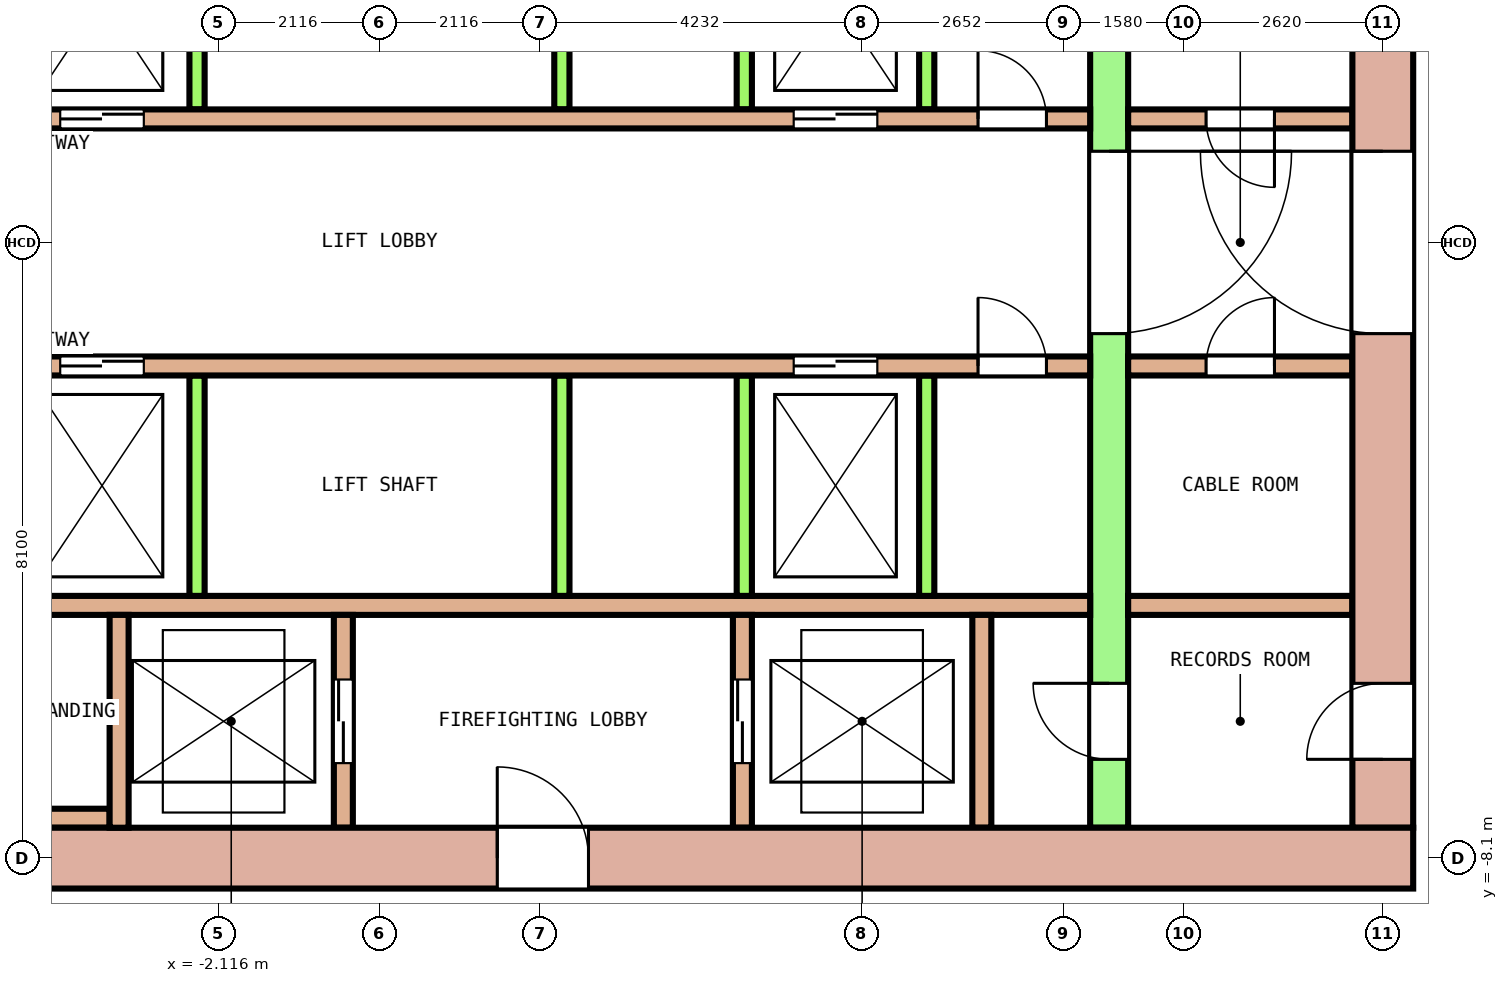
"""IFC4 building model, lengths in metres.
Left out: names, types, materials, properties, quantities, classifications, styles, units other than length and angle.
Written with IfcOpenShell. Run it as: python <this file> out.ifc"""

import sys

from ifc_helpers import new_model, si_unit, direction, frame, frame_2d, origin, place, context, subcontext, project, spatial, rectangle, extrude, element, fill, save


model = new_model("IFC4")
c1 = context("Model", 3, precision=1e-05, world=origin(), true_north=direction((0.0, 1.0)))
c2 = subcontext(c1, "Body", "Model", "MODEL_VIEW")
j1 = project(units=[si_unit("LENGTHUNIT", "METRE"), si_unit("PLANEANGLEUNIT", "RADIAN")], contexts=[c1])
p1 = place(None, origin())
s1 = spatial("IfcSite", under=j1, at=p1, CompositionType="ELEMENT")
p2 = place(p1, origin())
s2 = spatial("IfcBuilding", under=s1, at=p2, CompositionType="ELEMENT")
p3 = place(p2, frame((0.0, 0.0, 130.8)))
s3 = spatial("IfcBuildingStorey", under=s2, at=p3, CompositionType="ELEMENT", Elevation=130.8)
p4 = place(p3, frame((-13.6, -8.1, 0.0), z_axis=(0.0, 0.0, 1.0), x_axis=(1.0, 0.0, 0.0)))
e1 = element("IfcWall", 1, at=p4, inside=s3, PredefinedType="SHEAR", context=c2, shape_type="SweptSolid", body=[
    extrude(rectangle(XDim=27.2, YDim=0.8, at=frame_2d((13.6, 0.0))), origin(), (0.0, 0.0, 1.0), 4.1),
])
p5 = place(p4, frame((15.15, 0.0, 0.0)))
e2 = element("IfcOpeningElement", 2, at=p5, cuts=e1, PredefinedType="OPENING", context=c2, shape_type="SweptSolid", body=[
    extrude(rectangle(XDim=1.2, YDim=2.1, at=frame_2d((0.6, 1.05))), frame((0.0, 0.41, 0.0), z_axis=(0.0, -1.0, 0.0), x_axis=(1.0, 0.0, 0.0)), (0.0, 0.0, 1.0), 0.82),
])
p6 = place(p3, frame((13.2, -7.7, 0.0), z_axis=(0.0, 0.0, 1.0), x_axis=(0.0, 1.0, 0.0)))
e3 = element("IfcWall", 3, at=p6, inside=s3, PredefinedType="SHEAR", context=c2, shape_type="SweptSolid", body=[
    extrude(rectangle(XDim=15.4, YDim=0.8, at=frame_2d((7.7, 0.0))), origin(), (0.0, 0.0, 1.0), 4.1),
])
p7 = place(p6, frame((6.5, 0.0, 0.0)))
e4 = element("IfcOpeningElement", 4, at=p7, cuts=e3, PredefinedType="OPENING", context=c2, shape_type="SweptSolid", body=[
    extrude(rectangle(XDim=2.4, YDim=2.1, at=frame_2d((1.2, 1.05))), frame((0.0, 0.41, 0.0), z_axis=(0.0, -1.0, 0.0), x_axis=(1.0, 0.0, 0.0)), (0.0, 0.0, 1.0), 0.82),
])
p8 = place(p6, frame((13.4, 0.0, 0.0)))
e5 = element("IfcOpeningElement", 5, at=p8, cuts=e3, PredefinedType="OPENING", context=c2, shape_type="SweptSolid", body=[
    extrude(rectangle(XDim=1.2, YDim=2.1, at=frame_2d((0.6, 1.05))), frame((0.0, 0.41, 0.0), z_axis=(0.0, -1.0, 0.0), x_axis=(1.0, 0.0, 0.0)), (0.0, 0.0, 1.0), 0.82),
])
p9 = place(p6, frame((0.9, 0.0, 0.0)))
e6 = element("IfcOpeningElement", 6, at=p9, cuts=e3, PredefinedType="OPENING", context=c2, shape_type="SweptSolid", body=[
    extrude(rectangle(XDim=1.0, YDim=2.1, at=frame_2d((0.5, 1.05))), frame((0.0, 0.41, 0.0), z_axis=(0.0, -1.0, 0.0), x_axis=(1.0, 0.0, 0.0)), (0.0, 0.0, 1.0), 0.82),
])
p10 = place(p3, frame((9.6, -7.7, 0.0), z_axis=(0.0, 0.0, 1.0), x_axis=(0.0, 1.0, 0.0)))
e7 = element("IfcWall", 7, at=p10, inside=s3, PredefinedType="SHEAR", context=c2, shape_type="SweptSolid", body=[
    extrude(rectangle(XDim=15.4, YDim=0.5, at=frame_2d((7.7, 0.0))), origin(), (0.0, 0.0, 1.0), 4.1),
])
p11 = place(p10, frame((6.5, 0.0, 0.0)))
e8 = element("IfcOpeningElement", 8, at=p11, cuts=e7, PredefinedType="OPENING", context=c2, shape_type="SweptSolid", body=[
    extrude(rectangle(XDim=2.4, YDim=2.1, at=frame_2d((1.2, 1.05))), frame((0.0, 0.26, 0.0), z_axis=(0.0, -1.0, 0.0), x_axis=(1.0, 0.0, 0.0)), (0.0, 0.0, 1.0), 0.52),
])
p12 = place(p10, frame((13.4, 0.0, 0.0)))
e9 = element("IfcOpeningElement", 9, at=p12, cuts=e7, PredefinedType="OPENING", context=c2, shape_type="SweptSolid", body=[
    extrude(rectangle(XDim=1.2, YDim=2.1, at=frame_2d((0.6, 1.05))), frame((0.0, 0.26, 0.0), z_axis=(0.0, -1.0, 0.0), x_axis=(1.0, 0.0, 0.0)), (0.0, 0.0, 1.0), 0.52),
])
p13 = place(p10, frame((0.9, 0.0, 0.0)))
e10 = element("IfcOpeningElement", 10, at=p13, cuts=e7, PredefinedType="OPENING", context=c2, shape_type="SweptSolid", body=[
    extrude(rectangle(XDim=1.0, YDim=2.1, at=frame_2d((0.5, 1.05))), frame((0.0, 0.26, 0.0), z_axis=(0.0, -1.0, 0.0), x_axis=(1.0, 0.0, 0.0)), (0.0, 0.0, 1.0), 0.52),
])
p14 = place(p3, frame((-9.35, 1.625, 0.0), z_axis=(0.0, 0.0, 1.0), x_axis=(1.0, 0.0, 0.0)))
e11 = element("IfcWall", 11, at=p14, inside=s3, PredefinedType="SOLIDWALL", context=c2, shape_type="SweptSolid", body=[
    extrude(rectangle(XDim=18.7, YDim=0.25, at=frame_2d((9.35, 0.0))), origin(), (0.0, 0.0, 1.0), 4.1),
])
p15 = place(p14, frame((2.85, 0.0, 0.0)))
e12 = element("IfcOpeningElement", 12, at=p15, cuts=e11, PredefinedType="OPENING", context=c2, shape_type="SweptSolid", body=[
    extrude(rectangle(XDim=1.1, YDim=2.1, at=frame_2d((0.55, 1.05))), frame((0.0, 0.135, 0.0), z_axis=(0.0, -1.0, 0.0), x_axis=(1.0, 0.0, 0.0)), (0.0, 0.0, 1.0), 0.27),
])
p16 = place(p14, frame((5.15, 0.0, 0.0)))
e13 = element("IfcOpeningElement", 13, at=p16, cuts=e11, PredefinedType="OPENING", context=c2, shape_type="SweptSolid", body=[
    extrude(rectangle(XDim=1.1, YDim=2.1, at=frame_2d((0.55, 1.05))), frame((0.0, 0.135, 0.0), z_axis=(0.0, -1.0, 0.0), x_axis=(1.0, 0.0, 0.0)), (0.0, 0.0, 1.0), 0.27),
])
p17 = place(p14, frame((14.8, 0.0, 0.0)))
e14 = element("IfcOpeningElement", 14, at=p17, cuts=e11, PredefinedType="OPENING", context=c2, shape_type="SweptSolid", body=[
    extrude(rectangle(XDim=1.1, YDim=2.1, at=frame_2d((0.55, 1.05))), frame((0.0, 0.135, 0.0), z_axis=(0.0, -1.0, 0.0), x_axis=(1.0, 0.0, 0.0)), (0.0, 0.0, 1.0), 0.27),
])
p18 = place(p14, frame((0.575, 0.0, 0.0)))
e15 = element("IfcOpeningElement", 15, at=p18, cuts=e11, PredefinedType="OPENING", context=c2, shape_type="SweptSolid", body=[
    extrude(rectangle(XDim=0.9, YDim=2.1, at=frame_2d((0.45, 1.05))), frame((0.0, 0.135, 0.0), z_axis=(0.0, -1.0, 0.0), x_axis=(1.0, 0.0, 0.0)), (0.0, 0.0, 1.0), 0.27),
])
p19 = place(p14, frame((17.225, 0.0, 0.0)))
e16 = element("IfcOpeningElement", 16, at=p19, cuts=e11, PredefinedType="OPENING", context=c2, shape_type="SweptSolid", body=[
    extrude(rectangle(XDim=0.9, YDim=2.1, at=frame_2d((0.45, 1.05))), frame((0.0, 0.135, 0.0), z_axis=(0.0, -1.0, 0.0), x_axis=(1.0, 0.0, 0.0)), (0.0, 0.0, 1.0), 0.27),
])
p20 = place(p3, frame((9.85, 1.625, 0.0), z_axis=(0.0, 0.0, 1.0), x_axis=(1.0, 0.0, 0.0)))
e17 = element("IfcWall", 17, at=p20, inside=s3, PredefinedType="SOLIDWALL", context=c2, shape_type="SweptSolid", body=[
    extrude(rectangle(XDim=2.95, YDim=0.25, at=frame_2d((1.475, 0.0))), origin(), (0.0, 0.0, 1.0), 4.1),
])
p21 = place(p20, frame((1.025, 0.0, 0.0)))
e18 = element("IfcOpeningElement", 18, at=p21, cuts=e17, PredefinedType="OPENING", context=c2, shape_type="SweptSolid", body=[
    extrude(rectangle(XDim=0.9, YDim=2.1, at=frame_2d((0.45, 1.05))), frame((0.0, 0.135, 0.0), z_axis=(0.0, -1.0, 0.0), x_axis=(1.0, 0.0, 0.0)), (0.0, 0.0, 1.0), 0.27),
])
for number, where, z_axis, x_axis in (
    (19, (-2.4, 1.75, 0.0), (0.0, 0.0, 1.0), (0.0, 1.0, 0.0)),
    (20, (2.4, 1.75, 0.0), (0.0, 0.0, 1.0), (0.0, 1.0, 0.0)),
    (21, (4.8, 1.75, 0.0), (0.0, 0.0, 1.0), (0.0, 1.0, 0.0)),
    (22, (7.2, 1.75, 0.0), (0.0, 0.0, 1.0), (0.0, 1.0, 0.0)),
):
    element("IfcWall", number, at=place(p3, frame(where, z_axis=z_axis, x_axis=x_axis)), inside=s3, PredefinedType="SOLIDWALL", context=c2, shape_type="SweptSolid", body=[
        extrude(rectangle(XDim=2.9, YDim=0.2, at=frame_2d((1.45, 0.0))), origin(), (0.0, 0.0, 1.0), 4.1),
    ])
p22 = place(p3, frame((-9.35, -1.625, 0.0), z_axis=(0.0, 0.0, 1.0), x_axis=(1.0, 0.0, 0.0)))
e23 = element("IfcWall", 23, at=p22, inside=s3, PredefinedType="SOLIDWALL", context=c2, shape_type="SweptSolid", body=[
    extrude(rectangle(XDim=18.7, YDim=0.25, at=frame_2d((9.35, 0.0))), origin(), (0.0, 0.0, 1.0), 4.1),
])
p23 = place(p22, frame((2.85, 0.0, 0.0)))
e24 = element("IfcOpeningElement", 24, at=p23, cuts=e23, PredefinedType="OPENING", context=c2, shape_type="SweptSolid", body=[
    extrude(rectangle(XDim=1.1, YDim=2.1, at=frame_2d((0.55, 1.05))), frame((0.0, 0.135, 0.0), z_axis=(0.0, -1.0, 0.0), x_axis=(1.0, 0.0, 0.0)), (0.0, 0.0, 1.0), 0.27),
])
p24 = place(p22, frame((5.15, 0.0, 0.0)))
e25 = element("IfcOpeningElement", 25, at=p24, cuts=e23, PredefinedType="OPENING", context=c2, shape_type="SweptSolid", body=[
    extrude(rectangle(XDim=1.1, YDim=2.1, at=frame_2d((0.55, 1.05))), frame((0.0, 0.135, 0.0), z_axis=(0.0, -1.0, 0.0), x_axis=(1.0, 0.0, 0.0)), (0.0, 0.0, 1.0), 0.27),
])
p25 = place(p22, frame((14.8, 0.0, 0.0)))
e26 = element("IfcOpeningElement", 26, at=p25, cuts=e23, PredefinedType="OPENING", context=c2, shape_type="SweptSolid", body=[
    extrude(rectangle(XDim=1.1, YDim=2.1, at=frame_2d((0.55, 1.05))), frame((0.0, 0.135, 0.0), z_axis=(0.0, -1.0, 0.0), x_axis=(1.0, 0.0, 0.0)), (0.0, 0.0, 1.0), 0.27),
])
p26 = place(p22, frame((0.575, 0.0, 0.0)))
e27 = element("IfcOpeningElement", 27, at=p26, cuts=e23, PredefinedType="OPENING", context=c2, shape_type="SweptSolid", body=[
    extrude(rectangle(XDim=0.9, YDim=2.1, at=frame_2d((0.45, 1.05))), frame((0.0, 0.135, 0.0), z_axis=(0.0, -1.0, 0.0), x_axis=(1.0, 0.0, 0.0)), (0.0, 0.0, 1.0), 0.27),
])
p27 = place(p22, frame((17.225, 0.0, 0.0)))
e28 = element("IfcOpeningElement", 28, at=p27, cuts=e23, PredefinedType="OPENING", context=c2, shape_type="SweptSolid", body=[
    extrude(rectangle(XDim=0.9, YDim=2.1, at=frame_2d((0.45, 1.05))), frame((0.0, 0.135, 0.0), z_axis=(0.0, -1.0, 0.0), x_axis=(1.0, 0.0, 0.0)), (0.0, 0.0, 1.0), 0.27),
])
p28 = place(p3, frame((9.85, -1.625, 0.0), z_axis=(0.0, 0.0, 1.0), x_axis=(1.0, 0.0, 0.0)))
e29 = element("IfcWall", 29, at=p28, inside=s3, PredefinedType="SOLIDWALL", context=c2, shape_type="SweptSolid", body=[
    extrude(rectangle(XDim=2.95, YDim=0.25, at=frame_2d((1.475, 0.0))), origin(), (0.0, 0.0, 1.0), 4.1),
])
p29 = place(p28, frame((1.025, 0.0, 0.0)))
e30 = element("IfcOpeningElement", 30, at=p29, cuts=e29, PredefinedType="OPENING", context=c2, shape_type="SweptSolid", body=[
    extrude(rectangle(XDim=0.9, YDim=2.1, at=frame_2d((0.45, 1.05))), frame((0.0, 0.135, 0.0), z_axis=(0.0, -1.0, 0.0), x_axis=(1.0, 0.0, 0.0)), (0.0, 0.0, 1.0), 0.27),
])
p30 = place(p3, frame((-9.35, -4.775, 0.0), z_axis=(0.0, 0.0, 1.0), x_axis=(1.0, 0.0, 0.0)))
e31 = element("IfcWall", 31, at=p30, inside=s3, PredefinedType="SOLIDWALL", context=c2, shape_type="SweptSolid", body=[
    extrude(rectangle(XDim=18.7, YDim=0.25, at=frame_2d((9.35, 0.0))), origin(), (0.0, 0.0, 1.0), 4.1),
])
p31 = place(p3, frame((9.85, -4.775, 0.0), z_axis=(0.0, 0.0, 1.0), x_axis=(1.0, 0.0, 0.0)))
e32 = element("IfcWall", 32, at=p31, inside=s3, PredefinedType="SOLIDWALL", context=c2, shape_type="SweptSolid", body=[
    extrude(rectangle(XDim=2.95, YDim=0.25, at=frame_2d((1.475, 0.0))), origin(), (0.0, 0.0, 1.0), 4.1),
])
for number, where, z_axis, x_axis in (
    (33, (-2.4, -4.65, 0.0), (0.0, 0.0, 1.0), (0.0, 1.0, 0.0)),
    (34, (2.4, -4.65, 0.0), (0.0, 0.0, 1.0), (0.0, 1.0, 0.0)),
    (35, (4.8, -4.65, 0.0), (0.0, 0.0, 1.0), (0.0, 1.0, 0.0)),
    (36, (7.2, -4.65, 0.0), (0.0, 0.0, 1.0), (0.0, 1.0, 0.0)),
):
    element("IfcWall", number, at=place(p3, frame(where, z_axis=z_axis, x_axis=x_axis)), inside=s3, PredefinedType="SOLIDWALL", context=c2, shape_type="SweptSolid", body=[
        extrude(rectangle(XDim=2.9, YDim=0.2, at=frame_2d((1.45, 0.0))), origin(), (0.0, 0.0, 1.0), 4.1),
    ])
p32 = place(p3, frame((-9.35, -7.575, 0.0), z_axis=(0.0, 0.0, 1.0), x_axis=(1.0, 0.0, 0.0)))
e37 = element("IfcWall", 37, at=p32, inside=s3, PredefinedType="SOLIDWALL", context=c2, shape_type="SweptSolid", body=[
    extrude(rectangle(XDim=5.8, YDim=0.25, at=frame_2d((2.9, 0.0))), origin(), (0.0, 0.0, 1.0), 4.1),
])
p33 = place(p3, frame((-3.425, -7.7, 0.0), z_axis=(0.0, 0.0, 1.0), x_axis=(0.0, 1.0, 0.0)))
e38 = element("IfcWall", 38, at=p33, inside=s3, PredefinedType="SOLIDWALL", context=c2, shape_type="SweptSolid", body=[
    extrude(rectangle(XDim=2.8, YDim=0.25, at=frame_2d((1.4, 0.0))), origin(), (0.0, 0.0, 1.0), 4.1),
])
p34 = place(p3, frame((-0.475, -7.7, 0.0), z_axis=(0.0, 0.0, 1.0), x_axis=(0.0, 1.0, 0.0)))
e39 = element("IfcWall", 39, at=p34, inside=s3, PredefinedType="SOLIDWALL", context=c2, shape_type="SweptSolid", body=[
    extrude(rectangle(XDim=2.8, YDim=0.25, at=frame_2d((1.4, 0.0))), origin(), (0.0, 0.0, 1.0), 4.1),
])
p35 = place(p34, frame((0.85, 0.0, 0.0)))
e40 = element("IfcOpeningElement", 40, at=p35, cuts=e39, PredefinedType="OPENING", context=c2, shape_type="SweptSolid", body=[
    extrude(rectangle(XDim=1.1, YDim=2.1, at=frame_2d((0.55, 1.05))), frame((0.0, 0.135, 0.0), z_axis=(0.0, -1.0, 0.0), x_axis=(1.0, 0.0, 0.0)), (0.0, 0.0, 1.0), 0.27),
])
p36 = place(p3, frame((4.775, -7.7, 0.0), z_axis=(0.0, 0.0, 1.0), x_axis=(0.0, 1.0, 0.0)))
e41 = element("IfcWall", 41, at=p36, inside=s3, PredefinedType="SOLIDWALL", context=c2, shape_type="SweptSolid", body=[
    extrude(rectangle(XDim=2.8, YDim=0.25, at=frame_2d((1.4, 0.0))), origin(), (0.0, 0.0, 1.0), 4.1),
])
p37 = place(p36, frame((0.85, 0.0, 0.0)))
e42 = element("IfcOpeningElement", 42, at=p37, cuts=e41, PredefinedType="OPENING", context=c2, shape_type="SweptSolid", body=[
    extrude(rectangle(XDim=1.1, YDim=2.1, at=frame_2d((0.55, 1.05))), frame((0.0, 0.135, 0.0), z_axis=(0.0, -1.0, 0.0), x_axis=(1.0, 0.0, 0.0)), (0.0, 0.0, 1.0), 0.27),
])
p38 = place(p3, frame((7.925, -7.7, 0.0), z_axis=(0.0, 0.0, 1.0), x_axis=(0.0, 1.0, 0.0)))
e43 = element("IfcWall", 43, at=p38, inside=s3, PredefinedType="SOLIDWALL", context=c2, shape_type="SweptSolid", body=[
    extrude(rectangle(XDim=2.8, YDim=0.25, at=frame_2d((1.4, 0.0))), origin(), (0.0, 0.0, 1.0), 4.1),
])
p39 = place(p16, origin())
e44 = element("IfcDoor", 44, at=p39, inside=s3, OperationType="DOUBLE_DOOR_SLIDING", PredefinedType="DOOR", context=c2, shape_type="SweptSolid", body=[
    extrude(rectangle(XDim=1.1, YDim=2.1, at=frame_2d((0.55, 1.05))), frame((0.0, 0.075, 0.0), z_axis=(0.0, -1.0, 0.0), x_axis=(1.0, 0.0, 0.0)), (0.0, 0.0, 1.0), 0.15),
])
fill(e13, e44)
p40 = place(p17, origin())
e45 = element("IfcDoor", 45, at=p40, inside=s3, OperationType="DOUBLE_DOOR_SLIDING", PredefinedType="DOOR", context=c2, shape_type="SweptSolid", body=[
    extrude(rectangle(XDim=1.1, YDim=2.1, at=frame_2d((0.55, 1.05))), frame((0.0, 0.075, 0.0), z_axis=(0.0, -1.0, 0.0), x_axis=(1.0, 0.0, 0.0)), (0.0, 0.0, 1.0), 0.15),
])
fill(e14, e45)
p41 = place(p24, origin())
e46 = element("IfcDoor", 46, at=p41, inside=s3, OperationType="DOUBLE_DOOR_SLIDING", PredefinedType="DOOR", context=c2, shape_type="SweptSolid", body=[
    extrude(rectangle(XDim=1.1, YDim=2.1, at=frame_2d((0.55, 1.05))), frame((0.0, 0.075, 0.0), z_axis=(0.0, -1.0, 0.0), x_axis=(1.0, 0.0, 0.0)), (0.0, 0.0, 1.0), 0.15),
])
fill(e25, e46)
p42 = place(p25, origin())
e47 = element("IfcDoor", 47, at=p42, inside=s3, OperationType="DOUBLE_DOOR_SLIDING", PredefinedType="DOOR", context=c2, shape_type="SweptSolid", body=[
    extrude(rectangle(XDim=1.1, YDim=2.1, at=frame_2d((0.55, 1.05))), frame((0.0, 0.075, 0.0), z_axis=(0.0, -1.0, 0.0), x_axis=(1.0, 0.0, 0.0)), (0.0, 0.0, 1.0), 0.15),
])
fill(e26, e47)
p43 = place(p35, origin())
e48 = element("IfcDoor", 48, at=p43, inside=s3, OperationType="DOUBLE_DOOR_SLIDING", PredefinedType="DOOR", context=c2, shape_type="SweptSolid", body=[
    extrude(rectangle(XDim=1.1, YDim=2.1, at=frame_2d((0.55, 1.05))), frame((0.0, 0.075, 0.0), z_axis=(0.0, -1.0, 0.0), x_axis=(1.0, 0.0, 0.0)), (0.0, 0.0, 1.0), 0.15),
])
fill(e40, e48)
p44 = place(p37, origin())
e49 = element("IfcDoor", 49, at=p44, inside=s3, OperationType="DOUBLE_DOOR_SLIDING", PredefinedType="DOOR", context=c2, shape_type="SweptSolid", body=[
    extrude(rectangle(XDim=1.1, YDim=2.1, at=frame_2d((0.55, 1.05))), frame((0.0, 0.075, 0.0), z_axis=(0.0, -1.0, 0.0), x_axis=(1.0, 0.0, 0.0)), (0.0, 0.0, 1.0), 0.15),
])
fill(e42, e49)
p45 = place(p11, origin())
e50 = element("IfcDoor", 50, at=p45, inside=s3, OperationType="DOUBLE_DOOR_SINGLE_SWING", PredefinedType="DOOR", context=c2, shape_type="SweptSolid", body=[
    extrude(rectangle(XDim=2.4, YDim=2.1, at=frame_2d((1.2, 1.05))), frame((0.0, 0.2, 0.0), z_axis=(0.0, -1.0, 0.0), x_axis=(1.0, 0.0, 0.0)), (0.0, 0.0, 1.0), 0.4),
])
fill(e8, e50)
p46 = place(p7, origin())
e51 = element("IfcDoor", 51, at=p46, inside=s3, OperationType="DOUBLE_DOOR_SINGLE_SWING", PredefinedType="DOOR", context=c2, shape_type="SweptSolid", body=[
    extrude(rectangle(XDim=2.4, YDim=2.1, at=frame_2d((1.2, 1.05))), frame((0.0, 0.3, 0.0), z_axis=(0.0, -1.0, 0.0), x_axis=(1.0, 0.0, 0.0)), (0.0, 0.0, 1.0), 0.6),
])
fill(e4, e51)
p47 = place(p5, origin())
e52 = element("IfcDoor", 52, at=p47, inside=s3, OperationType="SINGLE_SWING_RIGHT", PredefinedType="DOOR", context=c2, shape_type="SweptSolid", body=[
    extrude(rectangle(XDim=1.2, YDim=2.1, at=frame_2d((0.6, 1.05))), frame((0.0, 0.3, 0.0), z_axis=(0.0, -1.0, 0.0), x_axis=(1.0, 0.0, 0.0)), (0.0, 0.0, 1.0), 0.6),
])
fill(e2, e52)
p48 = place(p13, origin())
e53 = element("IfcDoor", 53, at=p48, inside=s3, OperationType="SINGLE_SWING_RIGHT", PredefinedType="DOOR", context=c2, shape_type="SweptSolid", body=[
    extrude(rectangle(XDim=1.0, YDim=2.1, at=frame_2d((0.5, 1.05))), frame((0.0, 0.2, 0.0), z_axis=(0.0, -1.0, 0.0), x_axis=(1.0, 0.0, 0.0)), (0.0, 0.0, 1.0), 0.4),
])
fill(e10, e53)
p49 = place(p9, origin())
e54 = element("IfcDoor", 54, at=p49, inside=s3, OperationType="SINGLE_SWING_LEFT", PredefinedType="DOOR", context=c2, shape_type="SweptSolid", body=[
    extrude(rectangle(XDim=1.0, YDim=2.1, at=frame_2d((0.5, 1.05))), frame((0.0, 0.3, 0.0), z_axis=(0.0, -1.0, 0.0), x_axis=(1.0, 0.0, 0.0)), (0.0, 0.0, 1.0), 0.6),
])
fill(e6, e54)
p50 = place(p19, origin())
e55 = element("IfcDoor", 55, at=p50, inside=s3, OperationType="SINGLE_SWING_RIGHT", PredefinedType="DOOR", context=c2, shape_type="SweptSolid", body=[
    extrude(rectangle(XDim=0.9, YDim=2.1, at=frame_2d((0.45, 1.05))), frame((0.0, 0.075, 0.0), z_axis=(0.0, -1.0, 0.0), x_axis=(1.0, 0.0, 0.0)), (0.0, 0.0, 1.0), 0.15),
])
fill(e16, e55)
p51 = place(p21, origin())
e56 = element("IfcDoor", 56, at=p51, inside=s3, OperationType="SINGLE_SWING_LEFT", PredefinedType="DOOR", context=c2, shape_type="SweptSolid", body=[
    extrude(rectangle(XDim=0.9, YDim=2.1, at=frame_2d((0.45, 1.05))), frame((0.0, 0.075, 0.0), z_axis=(0.0, -1.0, 0.0), x_axis=(1.0, 0.0, 0.0)), (0.0, 0.0, 1.0), 0.15),
])
fill(e18, e56)
p52 = place(p27, origin())
e57 = element("IfcDoor", 57, at=p52, inside=s3, OperationType="SINGLE_SWING_RIGHT", PredefinedType="DOOR", context=c2, shape_type="SweptSolid", body=[
    extrude(rectangle(XDim=0.9, YDim=2.1, at=frame_2d((0.45, 1.05))), frame((0.0, 0.075, 0.0), z_axis=(0.0, -1.0, 0.0), x_axis=(1.0, 0.0, 0.0)), (0.0, 0.0, 1.0), 0.15),
])
fill(e28, e57)
p53 = place(p29, origin())
e58 = element("IfcDoor", 58, at=p53, inside=s3, OperationType="SINGLE_SWING_LEFT", PredefinedType="DOOR", context=c2, shape_type="SweptSolid", body=[
    extrude(rectangle(XDim=0.9, YDim=2.1, at=frame_2d((0.45, 1.05))), frame((0.0, 0.075, 0.0), z_axis=(0.0, -1.0, 0.0), x_axis=(1.0, 0.0, 0.0)), (0.0, 0.0, 1.0), 0.15),
])
fill(e30, e58)
save(model, sys.argv[1])
